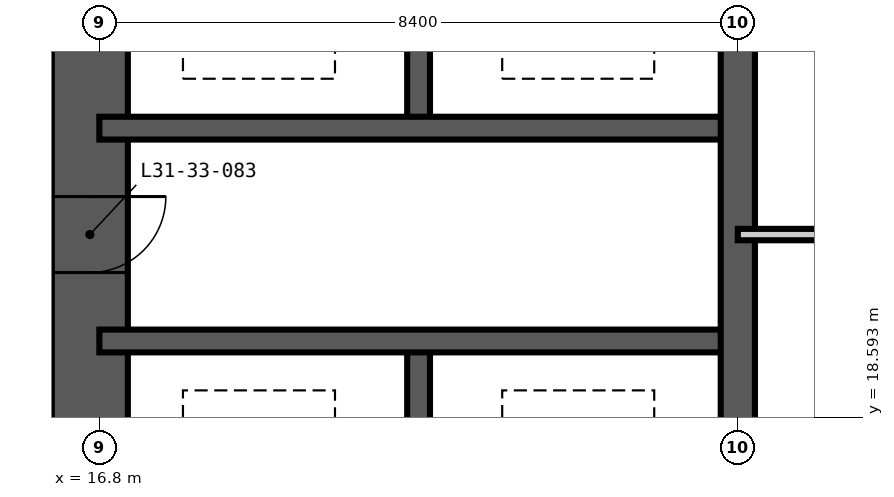
"""IFC4 building model, lengths in metres.
Left out: names, types, materials, properties, quantities, classifications, styles, units other than length and angle.
Written with IfcOpenShell. Run it as: python <this file> out.ifc"""

import sys

from ifc_helpers import new_model, si_unit, direction, frame, frame_2d, origin, place, context, subcontext, project, spatial, rectangle, extrude, element, fill, save


model = new_model("IFC4")
c1 = context("Model", 3, precision=1e-05, world=origin(), true_north=direction((0.0, 1.0)))
c2 = subcontext(c1, "Body", "Model", "MODEL_VIEW")
j1 = project(units=[si_unit("LENGTHUNIT", "METRE"), si_unit("PLANEANGLEUNIT", "RADIAN")], contexts=[c1])
p1 = place(None, origin())
s1 = spatial("IfcSite", under=j1, at=p1, CompositionType="ELEMENT")
p2 = place(p1, origin())
s2 = spatial("IfcBuilding", under=s1, at=p2, CompositionType="ELEMENT")
p3 = place(p2, frame((0.0, 0.0, 122.4)))
s3 = spatial("IfcBuildingStorey", under=s2, at=p3, CompositionType="ELEMENT", Elevation=122.4)
p4 = place(p3, frame((16.675, 41.625, -0.35), z_axis=(0.0, 0.0, 1.0), x_axis=(0.0, -1.0, 0.0)))
e1 = element("IfcWall", 1, at=p4, inside=s3, PredefinedType="SHEAR", context=c2, shape_type="SweptSolid", body=[
    extrude(rectangle(XDim=24.45, YDim=1.0, at=frame_2d((12.225, 0.0))), origin(), (0.0, 0.0, 1.0), 3.6),
])
p5 = place(p4, frame((11.325, 0.0, 0.35)))
e2 = element("IfcOpeningElement", 2, at=p5, cuts=e1, PredefinedType="OPENING", context=c2, shape_type="SweptSolid", body=[
    extrude(rectangle(XDim=1.8, YDim=2.2, at=frame_2d((0.9, 1.1))), frame((0.0, 0.51, 0.0), z_axis=(0.0, -1.0, 0.0), x_axis=(1.0, 0.0, 0.0)), (0.0, 0.0, 1.0), 1.02),
])
p6 = place(p4, frame((20.125, 0.0, 0.35)))
e3 = element("IfcOpeningElement", 3, at=p6, cuts=e1, PredefinedType="OPENING", context=c2, shape_type="SweptSolid", body=[
    extrude(rectangle(XDim=1.0, YDim=2.1, at=frame_2d((0.5, 1.05))), frame((0.0, 0.51, 0.0), z_axis=(0.0, -1.0, 0.0), x_axis=(1.0, 0.0, 0.0)), (0.0, 0.0, 1.0), 1.02),
])
p7 = place(p4, frame((5.425, 0.0, 0.35)))
e4 = element("IfcOpeningElement", 4, at=p7, cuts=e1, PredefinedType="OPENING", context=c2, shape_type="SweptSolid", body=[
    extrude(rectangle(XDim=1.0, YDim=2.1, at=frame_2d((0.5, 1.05))), frame((0.0, 0.51, 0.0), z_axis=(0.0, -1.0, 0.0), x_axis=(1.0, 0.0, 0.0)), (0.0, 0.0, 1.0), 1.02),
])
p8 = place(p3, frame((21.0, 16.8, -0.35), z_axis=(0.0, 0.0, 1.0), x_axis=(0.0, 1.0, 0.0)))
e5 = element("IfcWall", 5, at=p8, inside=s3, PredefinedType="SHEAR", context=c2, shape_type="SweptSolid", body=[
    extrude(rectangle(XDim=2.8, YDim=0.3, at=frame_2d((1.4, 0.0))), origin(), (0.0, 0.0, 1.0), 3.6),
])
p9 = place(p3, frame((21.0, 22.4, -0.35), z_axis=(0.0, 0.0, 1.0), x_axis=(0.0, 1.0, 0.0)))
e6 = element("IfcWall", 6, at=p9, inside=s3, PredefinedType="SHEAR", context=c2, shape_type="SweptSolid", body=[
    extrude(rectangle(XDim=5.6, YDim=0.3, at=frame_2d((2.8, 0.0))), origin(), (0.0, 0.0, 1.0), 3.6),
])
for number, where, z_axis, x_axis in (
    (7, (16.8, 19.6, -0.35), (0.0, 0.0, 1.0), (1.0, 0.0, 0.0)),
    (8, (16.8, 22.4, -0.35), (0.0, 0.0, 1.0), (1.0, 0.0, 0.0)),
):
    element("IfcWall", number, at=place(p3, frame(where, z_axis=z_axis, x_axis=x_axis)), inside=s3, PredefinedType="SHEAR", context=c2, shape_type="SweptSolid", body=[
        extrude(rectangle(XDim=8.4, YDim=0.3, at=frame_2d((4.2, 0.0))), origin(), (0.0, 0.0, 1.0), 3.6),
    ])
p10 = place(p3, frame((25.2, 16.8, -0.35), z_axis=(0.0, 0.0, 1.0), x_axis=(0.0, 1.0, 0.0)))
e9 = element("IfcWall", 9, at=p10, inside=s3, PredefinedType="SHEAR", context=c2, shape_type="SweptSolid", body=[
    extrude(rectangle(XDim=25.2, YDim=0.45, at=frame_2d((12.6, 0.0))), origin(), (0.0, 0.0, 1.0), 3.6),
])
p11 = place(p10, frame((12.1, 0.0, 0.35)))
e10 = element("IfcOpeningElement", 10, at=p11, cuts=e9, PredefinedType="OPENING", context=c2, shape_type="SweptSolid", body=[
    extrude(rectangle(XDim=1.0, YDim=2.1, at=frame_2d((0.5, 1.05))), frame((0.0, 0.235, 0.0), z_axis=(0.0, -1.0, 0.0), x_axis=(1.0, 0.0, 0.0)), (0.0, 0.0, 1.0), 0.47),
])
p12 = place(p3, frame((25.2, 21.0, 0.0), z_axis=(0.0, 0.0, 1.0), x_axis=(1.0, 0.0, 0.0)))
e11 = element("IfcWall", 11, at=p12, inside=s3, PredefinedType="PARTITIONING", context=c2, shape_type="SweptSolid", body=[
    extrude(rectangle(XDim=8.4, YDim=0.15, at=frame_2d((4.2, 0.0))), origin(), (0.0, 0.0, 1.0), 3.25),
])
p13 = place(p12, frame((3.7, 0.0, 0.0)))
e12 = element("IfcOpeningElement", 12, at=p13, cuts=e11, PredefinedType="OPENING", context=c2, shape_type="SweptSolid", body=[
    extrude(rectangle(XDim=1.0, YDim=2.1, at=frame_2d((0.5, 1.05))), frame((0.0, 0.085, 0.0), z_axis=(0.0, -1.0, 0.0), x_axis=(1.0, 0.0, 0.0)), (0.0, 0.0, 1.0), 0.17),
])
p14 = place(p6, origin())
e13 = element("IfcDoor", 13, at=p14, inside=s3, OperationType="SINGLE_SWING_LEFT", PredefinedType="DOOR", context=c2, shape_type="SweptSolid", body=[
    extrude(rectangle(XDim=1.0, YDim=2.1, at=frame_2d((0.5, 1.05))), frame((0.0, 0.025, 0.0), z_axis=(0.0, -1.0, 0.0), x_axis=(1.0, 0.0, 0.0)), (0.0, 0.0, 1.0), 0.05),
])
fill(e3, e13)
save(model, sys.argv[1])
